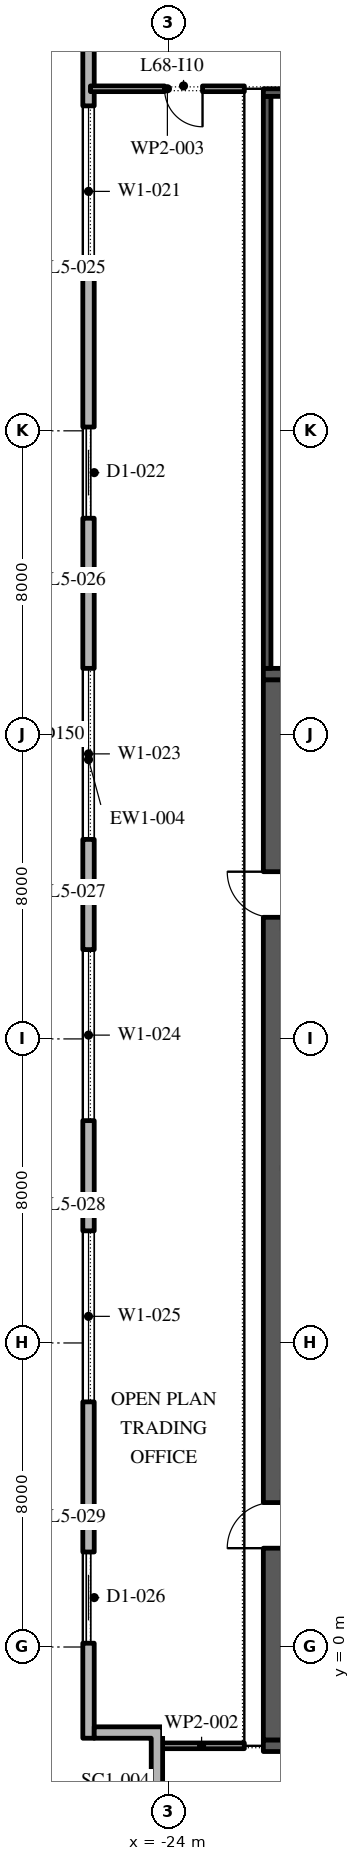
"""IFC4 building model, lengths in metres.
Left out: names, types, materials, properties, quantities, classifications, styles, units other than length and angle.
Written with IfcOpenShell. Run it as: python <this file> out.ifc"""

import sys

from ifc_helpers import new_model, si_unit, direction, frame, frame_2d, origin, place, context, subcontext, project, spatial, polyline, rectangle, outline, extrude, element, fill, save


model = new_model("IFC4")
c1 = context("Model", 3, precision=1e-05, world=origin(), true_north=direction((0.0, 1.0)))
c2 = subcontext(c1, "Body", "Model", "MODEL_VIEW")
j1 = project(units=[si_unit("LENGTHUNIT", "METRE"), si_unit("PLANEANGLEUNIT", "RADIAN")], contexts=[c1])
p1 = place(None, origin())
s1 = spatial("IfcSite", under=j1, at=p1, CompositionType="ELEMENT")
p2 = place(p1, origin())
s2 = spatial("IfcBuilding", under=s1, at=p2, CompositionType="ELEMENT")
p3 = place(p2, frame((0.0, 0.0, 313.2)))
s3 = spatial("IfcBuildingStorey", under=s2, at=p3, CompositionType="ELEMENT", Elevation=313.2)
p4 = place(p3, frame((-26.1, 49.1, 0.0), z_axis=(0.0, 0.0, 1.0), x_axis=(0.0, -1.0, 0.0)))
e1 = element("IfcWall", 1, at=p4, inside=s3, PredefinedType="STANDARD", context=c2, shape_type="SweptSolid", body=[
    extrude(rectangle(XDim=51.5, YDim=0.3, at=frame_2d((25.75, 0.0))), origin(), (0.0, 0.0, 1.0), 4.0),
])
p5 = place(p4, frame((1.3, 0.0, 0.45)))
e2 = element("IfcOpeningElement", 2, at=p5, cuts=e1, PredefinedType="OPENING", context=c2, shape_type="SweptSolid", body=[
    extrude(rectangle(XDim=4.5, YDim=3.05, at=frame_2d((2.25, 1.525))), frame((0.0, 0.16, 0.0), z_axis=(0.0, -1.0, 0.0), x_axis=(1.0, 0.0, 0.0)), (0.0, 0.0, 1.0), 0.32),
])
p6 = place(p4, frame((8.55, 0.0, 0.45)))
e3 = element("IfcOpeningElement", 3, at=p6, cuts=e1, PredefinedType="OPENING", context=c2, shape_type="SweptSolid", body=[
    extrude(rectangle(XDim=4.5, YDim=3.05, at=frame_2d((2.25, 1.525))), frame((0.0, 0.16, 0.0), z_axis=(0.0, -1.0, 0.0), x_axis=(1.0, 0.0, 0.0)), (0.0, 0.0, 1.0), 0.32),
])
p7 = place(p4, frame((17.0, 0.0, 0.0)))
e4 = element("IfcOpeningElement", 4, at=p7, cuts=e1, PredefinedType="OPENING", context=c2, shape_type="SweptSolid", body=[
    extrude(rectangle(XDim=2.4, YDim=3.5, at=frame_2d((1.2, 1.75))), frame((0.0, 0.16, 0.0), z_axis=(0.0, -1.0, 0.0), x_axis=(1.0, 0.0, 0.0)), (0.0, 0.0, 1.0), 0.32),
])
p8 = place(p4, frame((23.35, 0.0, 0.45)))
e5 = element("IfcOpeningElement", 5, at=p8, cuts=e1, PredefinedType="OPENING", context=c2, shape_type="SweptSolid", body=[
    extrude(rectangle(XDim=4.5, YDim=3.05, at=frame_2d((2.25, 1.525))), frame((0.0, 0.16, 0.0), z_axis=(0.0, -1.0, 0.0), x_axis=(1.0, 0.0, 0.0)), (0.0, 0.0, 1.0), 0.32),
])
p9 = place(p4, frame((30.75, 0.0, 0.45)))
e6 = element("IfcOpeningElement", 6, at=p9, cuts=e1, PredefinedType="OPENING", context=c2, shape_type="SweptSolid", body=[
    extrude(rectangle(XDim=4.5, YDim=3.05, at=frame_2d((2.25, 1.525))), frame((0.0, 0.16, 0.0), z_axis=(0.0, -1.0, 0.0), x_axis=(1.0, 0.0, 0.0)), (0.0, 0.0, 1.0), 0.32),
])
p10 = place(p4, frame((38.15, 0.0, 0.45)))
e7 = element("IfcOpeningElement", 7, at=p10, cuts=e1, PredefinedType="OPENING", context=c2, shape_type="SweptSolid", body=[
    extrude(rectangle(XDim=4.5, YDim=3.05, at=frame_2d((2.25, 1.525))), frame((0.0, 0.16, 0.0), z_axis=(0.0, -1.0, 0.0), x_axis=(1.0, 0.0, 0.0)), (0.0, 0.0, 1.0), 0.32),
])
p11 = place(p4, frame((46.6, 0.0, 0.0)))
e8 = element("IfcOpeningElement", 8, at=p11, cuts=e1, PredefinedType="OPENING", context=c2, shape_type="SweptSolid", body=[
    extrude(rectangle(XDim=2.4, YDim=3.5, at=frame_2d((1.2, 1.75))), frame((0.0, 0.16, 0.0), z_axis=(0.0, -1.0, 0.0), x_axis=(1.0, 0.0, 0.0)), (0.0, 0.0, 1.0), 0.32),
])
p12 = place(p3, origin())
e9 = element("IfcWall", 9, at=p12, inside=s3, PredefinedType="STANDARD", context=c2, shape_type="SweptSolid", body=[
    extrude(outline(polyline([(-22.65, -4.2), (-24.45, -4.2), (-24.45, -2.4), (-25.95, -2.4), (-25.95, -2.1), (-24.15, -2.1), (-24.15, -3.9), (-22.35, -3.9), (-22.35, -6.0), (-22.65, -6.0), (-22.65, -4.2)])), origin(), (0.0, 0.0, 1.0), 4.0),
])
p13 = place(p3, frame((-21.25, -2.45, 0.0), z_axis=(0.0, 0.0, 1.0), x_axis=(0.0, 1.0, 0.0)))
e10 = element("IfcWall", 10, at=p13, inside=s3, PredefinedType="SHEAR", context=c2, shape_type="SweptSolid", body=[
    extrude(rectangle(XDim=27.9, YDim=0.5, at=frame_2d((13.95, 0.0))), origin(), (0.0, 0.0, 1.0), 4.0),
])
p14 = place(p13, frame((5.05, 0.0, 0.0)))
e11 = element("IfcOpeningElement", 11, at=p14, cuts=e10, PredefinedType="OPENING", context=c2, shape_type="SweptSolid", body=[
    extrude(rectangle(XDim=1.2, YDim=2.1, at=frame_2d((0.6, 1.05))), frame((0.0, 0.26, 0.0), z_axis=(0.0, -1.0, 0.0), x_axis=(1.0, 0.0, 0.0)), (0.0, 0.0, 1.0), 0.52),
])
p15 = place(p13, frame((21.65, 0.0, 0.0)))
e12 = element("IfcOpeningElement", 12, at=p15, cuts=e10, PredefinedType="OPENING", context=c2, shape_type="SweptSolid", body=[
    extrude(rectangle(XDim=1.2, YDim=2.1, at=frame_2d((0.6, 1.05))), frame((0.0, 0.26, 0.0), z_axis=(0.0, -1.0, 0.0), x_axis=(1.0, 0.0, 0.0)), (0.0, 0.0, 1.0), 0.52),
])
for number, where, z_axis, x_axis in (
    (13, (-21.5, -2.6, 0.0), (0.0, 0.0, 1.0), (1.0, 0.0, 0.0)),
    (14, (-21.5, 25.6, 0.0), (0.0, 0.0, 1.0), (1.0, 0.0, 0.0)),
):
    element("IfcWall", number, at=place(p3, frame(where, z_axis=z_axis, x_axis=x_axis)), inside=s3, PredefinedType="SHEAR", context=c2, shape_type="SweptSolid", body=[
        extrude(rectangle(XDim=11.0, YDim=0.3, at=frame_2d((5.5, 0.0))), origin(), (0.0, 0.0, 1.0), 4.0),
    ])
p16 = place(p3, frame((-21.4, 25.75, 0.0), z_axis=(0.0, 0.0, 1.0), x_axis=(0.0, 1.0, 0.0)))
e15 = element("IfcWall", 15, at=p16, inside=s3, PredefinedType="SHEAR", context=c2, shape_type="SweptSolid", body=[
    extrude(rectangle(XDim=15.05, YDim=0.2, at=frame_2d((7.525, 0.0))), origin(), (0.0, 0.0, 1.0), 4.0),
])
p17 = place(p3, frame((-21.5, 40.9, 0.0), z_axis=(0.0, 0.0, 1.0), x_axis=(1.0, 0.0, 0.0)))
e16 = element("IfcWall", 16, at=p17, inside=s3, PredefinedType="SHEAR", context=c2, shape_type="SweptSolid", body=[
    extrude(rectangle(XDim=11.0, YDim=0.2, at=frame_2d((5.5, 0.0))), origin(), (0.0, 0.0, 1.0), 4.0),
])
p18 = place(p3, frame((-24.25, -2.6, 0.0), z_axis=(0.0, 0.0, 1.0), x_axis=(1.0, 0.0, 0.0)))
e17 = element("IfcWall", 17, at=p18, inside=s3, PredefinedType="PARTITIONING", context=c2, shape_type="SweptSolid", body=[
    extrude(rectangle(XDim=2.25, YDim=0.15, at=frame_2d((1.125, 0.0))), origin(), (0.0, 0.0, 1.0), 4.0),
])
p19 = place(p3, frame((-22.0, 41.0, 0.0), z_axis=(0.0, 0.0, 1.0), x_axis=(-1.0, 0.0, 0.0)))
e18 = element("IfcWall", 18, at=p19, inside=s3, PredefinedType="PARTITIONING", context=c2, shape_type="SweptSolid", body=[
    extrude(rectangle(XDim=4.05, YDim=0.15, at=frame_2d((2.025, 0.0))), origin(), (0.0, 0.0, 1.0), 4.0),
])
p20 = place(p19, frame((1.1, 0.0, 0.0)))
e19 = element("IfcOpeningElement", 19, at=p20, cuts=e18, PredefinedType="OPENING", context=c2, shape_type="SweptSolid", body=[
    extrude(rectangle(XDim=1.0, YDim=2.1, at=frame_2d((0.5, 1.05))), frame((0.0, 0.085, 0.0), z_axis=(0.0, -1.0, 0.0), x_axis=(1.0, 0.0, 0.0)), (0.0, 0.0, 1.0), 0.17),
])
p21 = place(p6, origin())
e20 = element("IfcWindow", 20, at=p21, inside=s3, PartitioningType="DOUBLE_PANEL_VERTICAL", PredefinedType="WINDOW", context=c2, shape_type="SweptSolid", body=[
    extrude(rectangle(XDim=4.5, YDim=3.05, at=frame_2d((2.25, 1.525))), frame((0.0, 0.03, 0.0), z_axis=(0.0, -1.0, 0.0), x_axis=(1.0, 0.0, 0.0)), (0.0, 0.0, 1.0), 0.06),
])
fill(e3, e20)
p22 = place(p7, origin())
e21 = element("IfcDoor", 21, at=p22, inside=s3, OperationType="DOUBLE_DOOR_SLIDING", PredefinedType="DOOR", context=c2, shape_type="SweptSolid", body=[
    extrude(rectangle(XDim=2.4, YDim=3.5, at=frame_2d((1.2, 1.75))), frame((0.0, 0.025, 0.0), z_axis=(0.0, -1.0, 0.0), x_axis=(1.0, 0.0, 0.0)), (0.0, 0.0, 1.0), 0.05),
])
fill(e4, e21)
p23 = place(p8, origin())
e22 = element("IfcWindow", 22, at=p23, inside=s3, PartitioningType="DOUBLE_PANEL_VERTICAL", PredefinedType="WINDOW", context=c2, shape_type="SweptSolid", body=[
    extrude(rectangle(XDim=4.5, YDim=3.05, at=frame_2d((2.25, 1.525))), frame((0.0, 0.03, 0.0), z_axis=(0.0, -1.0, 0.0), x_axis=(1.0, 0.0, 0.0)), (0.0, 0.0, 1.0), 0.06),
])
fill(e5, e22)
p24 = place(p9, origin())
e23 = element("IfcWindow", 23, at=p24, inside=s3, PartitioningType="DOUBLE_PANEL_VERTICAL", PredefinedType="WINDOW", context=c2, shape_type="SweptSolid", body=[
    extrude(rectangle(XDim=4.5, YDim=3.05, at=frame_2d((2.25, 1.525))), frame((0.0, 0.03, 0.0), z_axis=(0.0, -1.0, 0.0), x_axis=(1.0, 0.0, 0.0)), (0.0, 0.0, 1.0), 0.06),
])
fill(e6, e23)
p25 = place(p10, origin())
e24 = element("IfcWindow", 24, at=p25, inside=s3, PartitioningType="DOUBLE_PANEL_VERTICAL", PredefinedType="WINDOW", context=c2, shape_type="SweptSolid", body=[
    extrude(rectangle(XDim=4.5, YDim=3.05, at=frame_2d((2.25, 1.525))), frame((0.0, 0.03, 0.0), z_axis=(0.0, -1.0, 0.0), x_axis=(1.0, 0.0, 0.0)), (0.0, 0.0, 1.0), 0.06),
])
fill(e7, e24)
p26 = place(p11, origin())
e25 = element("IfcDoor", 25, at=p26, inside=s3, OperationType="DOUBLE_DOOR_SLIDING", PredefinedType="DOOR", context=c2, shape_type="SweptSolid", body=[
    extrude(rectangle(XDim=2.4, YDim=3.5, at=frame_2d((1.2, 1.75))), frame((0.0, 0.025, 0.0), z_axis=(0.0, -1.0, 0.0), x_axis=(1.0, 0.0, 0.0)), (0.0, 0.0, 1.0), 0.05),
])
fill(e8, e25)
p27 = place(p14, origin())
e26 = element("IfcDoor", 26, at=p27, inside=s3, OperationType="SINGLE_SWING_RIGHT", PredefinedType="DOOR", context=c2, shape_type="SweptSolid", body=[
    extrude(rectangle(XDim=1.2, YDim=2.1, at=frame_2d((0.6, 1.05))), frame((0.0, 0.025, 0.0), z_axis=(0.0, -1.0, 0.0), x_axis=(1.0, 0.0, 0.0)), (0.0, 0.0, 1.0), 0.05),
])
fill(e11, e26)
p28 = place(p15, origin())
e27 = element("IfcDoor", 27, at=p28, inside=s3, OperationType="SINGLE_SWING_LEFT", PredefinedType="DOOR", context=c2, shape_type="SweptSolid", body=[
    extrude(rectangle(XDim=1.2, YDim=2.1, at=frame_2d((0.6, 1.05))), frame((0.0, 0.025, 0.0), z_axis=(0.0, -1.0, 0.0), x_axis=(1.0, 0.0, 0.0)), (0.0, 0.0, 1.0), 0.05),
])
fill(e12, e27)
p29 = place(p20, origin())
e28 = element("IfcDoor", 28, at=p29, inside=s3, OperationType="SINGLE_SWING_RIGHT", PredefinedType="DOOR", context=c2, shape_type="SweptSolid", body=[
    extrude(rectangle(XDim=1.0, YDim=2.1, at=frame_2d((0.5, 1.05))), frame((0.0, 0.025, 0.0), z_axis=(0.0, -1.0, 0.0), x_axis=(1.0, 0.0, 0.0)), (0.0, 0.0, 1.0), 0.05),
])
fill(e19, e28)
save(model, sys.argv[1])
